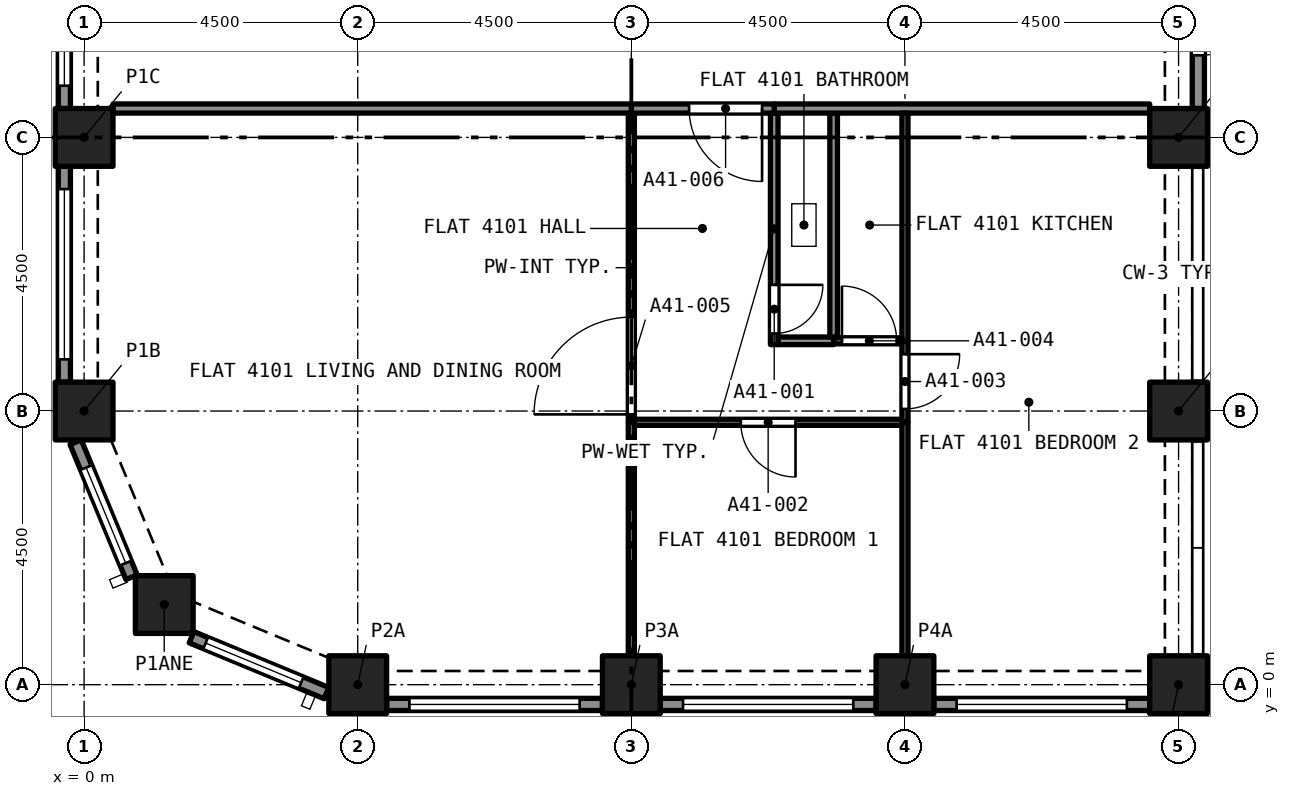
"""IFC4 building model, lengths in metres.
Left out: names, types, materials, properties, quantities, classifications, styles, units other than length and angle.
Written with IfcOpenShell. Run it as: python <this file> out.ifc"""

import sys

from ifc_helpers import new_model, si_unit, direction, frame, frame_2d, origin, origin_2d, place, context, subcontext, project, spatial, rectangle, extrude, element, fill, save


model = new_model("IFC4")
c1 = context("Model", 3, precision=1e-05, world=origin(), true_north=direction((0.0, 1.0)))
c2 = subcontext(c1, "Body", "Model", "MODEL_VIEW")
j1 = project(units=[si_unit("LENGTHUNIT", "METRE"), si_unit("PLANEANGLEUNIT", "RADIAN")], contexts=[c1])
p1 = place(None, origin())
s1 = spatial("IfcSite", under=j1, at=p1, CompositionType="ELEMENT")
p2 = place(p1, origin())
s2 = spatial("IfcBuilding", under=s1, at=p2, CompositionType="ELEMENT")
p3 = place(p2, frame((0.0, 0.0, 146.2)))
s3 = spatial("IfcBuildingStorey", under=s2, at=p3, CompositionType="ELEMENT", Elevation=146.2)
for number, where, z_axis, x_axis in (
    (1, (4.5, 0.0, 0.0), (0.0, 0.0, 1.0), (1.0, 0.0, 0.0)),
    (2, (9.0, 0.0, 0.0), (0.0, 0.0, 1.0), (1.0, 0.0, 0.0)),
    (3, (13.5, 0.0, 0.0), (0.0, 0.0, 1.0), (1.0, 0.0, 0.0)),
    (4, (18.0, 0.0, 0.0), (0.0, 0.0, 1.0), (1.0, 0.0, 0.0)),
    (5, (1.318, 1.318, 0.0), (0.0, 0.0, 1.0), (1.0, 0.0, 0.0)),
    (6, (0.0, 4.5, 0.0), (0.0, 0.0, 1.0), (1.0, 0.0, 0.0)),
    (7, (18.0, 4.5, 0.0), (0.0, 0.0, 1.0), (1.0, 0.0, 0.0)),
    (8, (0.0, 9.0, 0.0), (0.0, 0.0, 1.0), (1.0, 0.0, 0.0)),
    (9, (18.0, 9.0, 0.0), (0.0, 0.0, 1.0), (1.0, 0.0, 0.0)),
):
    element("IfcColumn", number, at=place(p3, frame(where, z_axis=z_axis, x_axis=x_axis)), inside=s3, PredefinedType="COLUMN", context=c2, shape_type="SweptSolid", body=[
        extrude(rectangle(XDim=0.95, YDim=0.95, at=origin_2d()), origin(), (0.0, 0.0, 1.0), 4.4),
    ])
p4 = place(p3, frame((-0.325, 9.475, 0.0), z_axis=(0.0, 0.0, 1.0), x_axis=(0.0, 1.0, 0.0)))
e10 = element("IfcWall", 10, at=p4, inside=s3, PredefinedType="SOLIDWALL", context=c2, shape_type="SweptSolid", body=[
    extrude(rectangle(XDim=3.55, YDim=0.2, at=frame_2d((1.775, 0.0))), origin(), (0.0, 0.0, 1.0), 4.4),
])
p5 = place(p4, frame((0.375, 0.0, 0.45)))
e11 = element("IfcOpeningElement", 11, at=p5, cuts=e10, PredefinedType="OPENING", context=c2, shape_type="SweptSolid", body=[
    extrude(rectangle(XDim=2.8, YDim=2.55, at=frame_2d((1.4, 1.275))), frame((0.0, 0.11, 0.0), z_axis=(0.0, -1.0, 0.0), x_axis=(1.0, 0.0, 0.0)), (0.0, 0.0, 1.0), 0.22),
])
p6 = place(p3, frame((-0.325, 4.975, 0.0), z_axis=(0.0, 0.0, 1.0), x_axis=(0.0, 1.0, 0.0)))
e12 = element("IfcWall", 12, at=p6, inside=s3, PredefinedType="SOLIDWALL", context=c2, shape_type="SweptSolid", body=[
    extrude(rectangle(XDim=3.55, YDim=0.2, at=frame_2d((1.775, 0.0))), origin(), (0.0, 0.0, 1.0), 4.4),
])
p7 = place(p6, frame((0.375, 0.0, 0.45)))
e13 = element("IfcOpeningElement", 13, at=p7, cuts=e12, PredefinedType="OPENING", context=c2, shape_type="SweptSolid", body=[
    extrude(rectangle(XDim=2.8, YDim=2.55, at=frame_2d((1.4, 1.275))), frame((0.0, 0.11, 0.0), z_axis=(0.0, -1.0, 0.0), x_axis=(1.0, 0.0, 0.0)), (0.0, 0.0, 1.0), 0.22),
])
p8 = place(p3, frame((0.78, 1.767, 0.0), z_axis=(0.0, 0.0, 1.0), x_axis=(-0.382680855588, 0.923880599843, 0.0)))
e14 = element("IfcWall", 14, at=p8, inside=s3, PredefinedType="SOLIDWALL", context=c2, shape_type="SweptSolid", body=[
    extrude(rectangle(XDim=2.403, YDim=0.2, at=frame_2d((1.201, 0.0))), origin(), (0.0, 0.0, 1.0), 4.4),
])
p9 = place(p8, frame((0.251, 0.0, 0.45)))
e15 = element("IfcOpeningElement", 15, at=p9, cuts=e14, PredefinedType="OPENING", context=c2, shape_type="SweptSolid", body=[
    extrude(rectangle(XDim=1.7, YDim=2.55, at=frame_2d((0.85, 1.275))), frame((0.0, 0.11, 0.0), z_axis=(0.0, -1.0, 0.0), x_axis=(1.0, 0.0, 0.0)), (0.0, 0.0, 1.0), 0.22),
])
p10 = place(p3, frame((3.987, -0.139, 0.0), z_axis=(0.0, 0.0, 1.0), x_axis=(-0.923880599843, 0.382680855588, 0.0)))
e16 = element("IfcWall", 16, at=p10, inside=s3, PredefinedType="SOLIDWALL", context=c2, shape_type="SweptSolid", body=[
    extrude(rectangle(XDim=2.403, YDim=0.2, at=frame_2d((1.201, 0.0))), origin(), (0.0, 0.0, 1.0), 4.4),
])
p11 = place(p10, frame((0.451, 0.0, 0.45)))
e17 = element("IfcOpeningElement", 17, at=p11, cuts=e16, PredefinedType="OPENING", context=c2, shape_type="SweptSolid", body=[
    extrude(rectangle(XDim=1.7, YDim=2.55, at=frame_2d((0.85, 1.275))), frame((0.0, 0.11, 0.0), z_axis=(0.0, -1.0, 0.0), x_axis=(1.0, 0.0, 0.0)), (0.0, 0.0, 1.0), 0.22),
])
p12 = place(p3, frame((8.525, -0.325, 0.0), z_axis=(0.0, 0.0, 1.0), x_axis=(-1.0, 0.0, 0.0)))
e18 = element("IfcWall", 18, at=p12, inside=s3, PredefinedType="SOLIDWALL", context=c2, shape_type="SweptSolid", body=[
    extrude(rectangle(XDim=3.55, YDim=0.2, at=frame_2d((1.775, 0.0))), origin(), (0.0, 0.0, 1.0), 4.4),
])
p13 = place(p12, frame((0.375, 0.0, 0.45)))
e19 = element("IfcOpeningElement", 19, at=p13, cuts=e18, PredefinedType="OPENING", context=c2, shape_type="SweptSolid", body=[
    extrude(rectangle(XDim=2.8, YDim=2.55, at=frame_2d((1.4, 1.275))), frame((0.0, 0.11, 0.0), z_axis=(0.0, -1.0, 0.0), x_axis=(1.0, 0.0, 0.0)), (0.0, 0.0, 1.0), 0.22),
])
p14 = place(p3, frame((13.025, -0.325, 0.0), z_axis=(0.0, 0.0, 1.0), x_axis=(-1.0, 0.0, 0.0)))
e20 = element("IfcWall", 20, at=p14, inside=s3, PredefinedType="SOLIDWALL", context=c2, shape_type="SweptSolid", body=[
    extrude(rectangle(XDim=3.55, YDim=0.2, at=frame_2d((1.775, 0.0))), origin(), (0.0, 0.0, 1.0), 4.4),
])
p15 = place(p14, frame((0.375, 0.0, 0.45)))
e21 = element("IfcOpeningElement", 21, at=p15, cuts=e20, PredefinedType="OPENING", context=c2, shape_type="SweptSolid", body=[
    extrude(rectangle(XDim=2.8, YDim=2.55, at=frame_2d((1.4, 1.275))), frame((0.0, 0.11, 0.0), z_axis=(0.0, -1.0, 0.0), x_axis=(1.0, 0.0, 0.0)), (0.0, 0.0, 1.0), 0.22),
])
p16 = place(p3, frame((17.525, -0.325, 0.0), z_axis=(0.0, 0.0, 1.0), x_axis=(-1.0, 0.0, 0.0)))
e22 = element("IfcWall", 22, at=p16, inside=s3, PredefinedType="SOLIDWALL", context=c2, shape_type="SweptSolid", body=[
    extrude(rectangle(XDim=3.55, YDim=0.2, at=frame_2d((1.775, 0.0))), origin(), (0.0, 0.0, 1.0), 4.4),
])
p17 = place(p16, frame((0.375, 0.0, 0.45)))
e23 = element("IfcOpeningElement", 23, at=p17, cuts=e22, PredefinedType="OPENING", context=c2, shape_type="SweptSolid", body=[
    extrude(rectangle(XDim=2.8, YDim=2.55, at=frame_2d((1.4, 1.275))), frame((0.0, 0.11, 0.0), z_axis=(0.0, -1.0, 0.0), x_axis=(1.0, 0.0, 0.0)), (0.0, 0.0, 1.0), 0.22),
])
p18 = place(p3, frame((18.325, 13.025, 0.0), z_axis=(0.0, 0.0, 1.0), x_axis=(0.0, -1.0, 0.0)))
e24 = element("IfcWall", 24, at=p18, inside=s3, PredefinedType="SOLIDWALL", context=c2, shape_type="SweptSolid", body=[
    extrude(rectangle(XDim=3.55, YDim=0.2, at=frame_2d((1.775, 0.0))), origin(), (0.0, 0.0, 1.0), 4.4),
])
p19 = place(p18, frame((0.875, 0.0, 0.0)))
e25 = element("IfcOpeningElement", 25, at=p19, cuts=e24, PredefinedType="OPENING", context=c2, shape_type="SweptSolid", body=[
    extrude(rectangle(XDim=1.8, YDim=2.4, at=frame_2d((0.9, 1.2))), frame((0.0, 0.11, 0.0), z_axis=(0.0, -1.0, 0.0), x_axis=(1.0, 0.0, 0.0)), (0.0, 0.0, 1.0), 0.22),
])
p20 = place(p3, frame((11.413, 5.655, 0.0), z_axis=(0.0, 0.0, 1.0), x_axis=(1.0, 0.0, 0.0)))
e26 = element("IfcWall", 26, at=p20, inside=s3, PredefinedType="PARTITIONING", context=c2, shape_type="SweptSolid", body=[
    extrude(rectangle(XDim=0.915, YDim=0.125, at=frame_2d((0.458, 0.0))), origin(), (0.0, 0.0, 1.0), 4.1),
])
p21 = place(p3, frame((11.35, 9.4, 0.0), z_axis=(0.0, 0.0, 1.0), x_axis=(0.0, -1.0, 0.0)))
e27 = element("IfcWall", 27, at=p21, inside=s3, PredefinedType="PARTITIONING", context=c2, shape_type="SweptSolid", body=[
    extrude(rectangle(XDim=3.807, YDim=0.125, at=frame_2d((1.904, 0.0))), origin(), (0.0, 0.0, 1.0), 4.1),
])
p22 = place(p21, frame((2.825, 0.0, 0.0)))
e28 = element("IfcOpeningElement", 28, at=p22, cuts=e27, PredefinedType="OPENING", context=c2, shape_type="SweptSolid", body=[
    extrude(rectangle(XDim=0.8, YDim=2.1, at=frame_2d((0.4, 1.05))), frame((0.0, 0.073, 0.0), z_axis=(0.0, -1.0, 0.0), x_axis=(1.0, 0.0, 0.0)), (0.0, 0.0, 1.0), 0.145),
])
p23 = place(p3, frame((12.327, 5.718, 0.0), z_axis=(0.0, 0.0, 1.0), x_axis=(0.0, 1.0, 0.0)))
e29 = element("IfcWall", 29, at=p23, inside=s3, PredefinedType="PARTITIONING", context=c2, shape_type="SweptSolid", body=[
    extrude(rectangle(XDim=3.682, YDim=0.125, at=frame_2d((1.841, 0.0))), origin(), (0.0, 0.0, 1.0), 4.1),
])
p24 = place(p3, frame((11.35, 9.475, 0.0), z_axis=(0.0, 0.0, 1.0), x_axis=(1.0, 0.0, 0.0)))
e30 = element("IfcWall", 30, at=p24, inside=s3, PredefinedType="PARTITIONING", context=c2, shape_type="SweptSolid", body=[
    extrude(rectangle(XDim=6.175, YDim=0.15, at=frame_2d((3.087, 0.0))), origin(), (0.0, 0.0, 1.0), 4.1),
])
p25 = place(p3, frame((13.5, 0.475, 0.0), z_axis=(0.0, 0.0, 1.0), x_axis=(0.0, 1.0, 0.0)))
e31 = element("IfcWall", 31, at=p25, inside=s3, PredefinedType="PARTITIONING", context=c2, shape_type="SweptSolid", body=[
    extrude(rectangle(XDim=3.84, YDim=0.1, at=frame_2d((1.92, 0.0))), origin(), (0.0, 0.0, 1.0), 4.1),
])
p26 = place(p3, frame((13.45, 4.315, 0.0), z_axis=(0.0, 0.0, 1.0), x_axis=(-1.0, 0.0, 0.0)))
e32 = element("IfcWall", 32, at=p26, inside=s3, PredefinedType="PARTITIONING", context=c2, shape_type="SweptSolid", body=[
    extrude(rectangle(XDim=4.4, YDim=0.1, at=frame_2d((2.2, 0.0))), origin(), (0.0, 0.0, 1.0), 4.1),
])
p27 = place(p26, frame((1.75, 0.0, 0.0)))
e33 = element("IfcOpeningElement", 33, at=p27, cuts=e32, PredefinedType="OPENING", context=c2, shape_type="SweptSolid", body=[
    extrude(rectangle(XDim=0.9, YDim=2.1, at=frame_2d((0.45, 1.05))), frame((0.0, 0.06, 0.0), z_axis=(0.0, -1.0, 0.0), x_axis=(1.0, 0.0, 0.0)), (0.0, 0.0, 1.0), 0.12),
])
p28 = place(p3, frame((9.0, 0.475, 0.0), z_axis=(0.0, 0.0, 1.0), x_axis=(0.0, 1.0, 0.0)))
e34 = element("IfcWall", 34, at=p28, inside=s3, PredefinedType="PARTITIONING", context=c2, shape_type="SweptSolid", body=[
    extrude(rectangle(XDim=3.84, YDim=0.1, at=frame_2d((1.92, 0.0))), origin(), (0.0, 0.0, 1.0), 4.1),
])
p29 = place(p3, frame((13.5, 5.655, 0.0), z_axis=(0.0, 0.0, 1.0), x_axis=(0.0, -1.0, 0.0)))
e35 = element("IfcWall", 35, at=p29, inside=s3, PredefinedType="PARTITIONING", context=c2, shape_type="SweptSolid", body=[
    extrude(rectangle(XDim=1.34, YDim=0.1, at=frame_2d((0.67, 0.0))), origin(), (0.0, 0.0, 1.0), 4.1),
])
p30 = place(p29, frame((0.22, 0.0, 0.0)))
e36 = element("IfcOpeningElement", 36, at=p30, cuts=e35, PredefinedType="OPENING", context=c2, shape_type="SweptSolid", body=[
    extrude(rectangle(XDim=0.9, YDim=2.1, at=frame_2d((0.45, 1.05))), frame((0.0, 0.06, 0.0), z_axis=(0.0, -1.0, 0.0), x_axis=(1.0, 0.0, 0.0)), (0.0, 0.0, 1.0), 0.12),
])
p31 = place(p3, frame((13.5, 5.655, 0.0), z_axis=(0.0, 0.0, 1.0), x_axis=(0.0, 1.0, 0.0)))
e37 = element("IfcWall", 37, at=p31, inside=s3, PredefinedType="PARTITIONING", context=c2, shape_type="SweptSolid", body=[
    extrude(rectangle(XDim=3.745, YDim=0.1, at=frame_2d((1.873, 0.0))), origin(), (0.0, 0.0, 1.0), 4.1),
])
p32 = place(p3, frame((12.327, 5.655, 0.0), z_axis=(0.0, 0.0, 1.0), x_axis=(1.0, 0.0, 0.0)))
e38 = element("IfcWall", 38, at=p32, inside=s3, PredefinedType="PARTITIONING", context=c2, shape_type="SweptSolid", body=[
    extrude(rectangle(XDim=1.123, YDim=0.1, at=frame_2d((0.561, 0.0))), origin(), (0.0, 0.0, 1.0), 4.1),
])
p33 = place(p32, frame((0.136, 0.0, 0.0)))
e39 = element("IfcOpeningElement", 39, at=p33, cuts=e38, PredefinedType="OPENING", context=c2, shape_type="SweptSolid", body=[
    extrude(rectangle(XDim=0.9, YDim=2.1, at=frame_2d((0.45, 1.05))), frame((0.0, 0.06, 0.0), z_axis=(0.0, -1.0, 0.0), x_axis=(1.0, 0.0, 0.0)), (0.0, 0.0, 1.0), 0.12),
])
p34 = place(p3, frame((9.0, 4.315, 0.0), z_axis=(0.0, 0.0, 1.0), x_axis=(0.0, 1.0, 0.0)))
e40 = element("IfcWall", 40, at=p34, inside=s3, PredefinedType="PARTITIONING", context=c2, shape_type="SweptSolid", body=[
    extrude(rectangle(XDim=5.085, YDim=0.1, at=frame_2d((2.542, 0.0))), origin(), (0.0, 0.0, 1.0), 4.1),
])
p35 = place(p34, frame((0.13, 0.0, 0.0)))
e41 = element("IfcOpeningElement", 41, at=p35, cuts=e40, PredefinedType="OPENING", context=c2, shape_type="SweptSolid", body=[
    extrude(rectangle(XDim=1.6, YDim=2.1, at=frame_2d((0.8, 1.05))), frame((0.0, 0.06, 0.0), z_axis=(0.0, -1.0, 0.0), x_axis=(1.0, 0.0, 0.0)), (0.0, 0.0, 1.0), 0.12),
])
p36 = place(p3, frame((11.35, 9.475, 0.0), z_axis=(0.0, 0.0, 1.0), x_axis=(-1.0, 0.0, 0.0)))
e42 = element("IfcWall", 42, at=p36, inside=s3, PredefinedType="PARTITIONING", context=c2, shape_type="SweptSolid", body=[
    extrude(rectangle(XDim=2.35, YDim=0.15, at=frame_2d((1.175, 0.0))), origin(), (0.0, 0.0, 1.0), 4.1),
])
p37 = place(p36, frame((0.2, 0.0, 0.0)))
e43 = element("IfcOpeningElement", 43, at=p37, cuts=e42, PredefinedType="OPENING", context=c2, shape_type="SweptSolid", body=[
    extrude(rectangle(XDim=1.2, YDim=2.4, at=frame_2d((0.6, 1.2))), frame((0.0, 0.085, 0.0), z_axis=(0.0, -1.0, 0.0), x_axis=(1.0, 0.0, 0.0)), (0.0, 0.0, 1.0), 0.17),
])
p38 = place(p3, frame((0.475, 9.475, 0.0), z_axis=(0.0, 0.0, 1.0), x_axis=(1.0, 0.0, 0.0)))
e44 = element("IfcWall", 44, at=p38, inside=s3, PredefinedType="PARTITIONING", context=c2, shape_type="SweptSolid", body=[
    extrude(rectangle(XDim=8.525, YDim=0.15, at=frame_2d((4.262, 0.0))), origin(), (0.0, 0.0, 1.0), 4.1),
])
p39 = place(p5, origin())
e45 = element("IfcWindow", 45, at=p39, inside=s3, PartitioningType="SINGLE_PANEL", PredefinedType="WINDOW", context=c2, shape_type="SweptSolid", body=[
    extrude(rectangle(XDim=2.8, YDim=2.55, at=frame_2d((1.4, 1.275))), frame((0.0, 0.03, 0.0), z_axis=(0.0, -1.0, 0.0), x_axis=(1.0, 0.0, 0.0)), (0.0, 0.0, 1.0), 0.06),
])
fill(e11, e45)
p40 = place(p7, origin())
e46 = element("IfcWindow", 46, at=p40, inside=s3, PartitioningType="SINGLE_PANEL", PredefinedType="WINDOW", context=c2, shape_type="SweptSolid", body=[
    extrude(rectangle(XDim=2.8, YDim=2.55, at=frame_2d((1.4, 1.275))), frame((0.0, 0.03, 0.0), z_axis=(0.0, -1.0, 0.0), x_axis=(1.0, 0.0, 0.0)), (0.0, 0.0, 1.0), 0.06),
])
fill(e13, e46)
p41 = place(p9, origin())
e47 = element("IfcWindow", 47, at=p41, inside=s3, PartitioningType="SINGLE_PANEL", PredefinedType="WINDOW", context=c2, shape_type="SweptSolid", body=[
    extrude(rectangle(XDim=1.7, YDim=2.55, at=frame_2d((0.85, 1.275))), frame((0.0, 0.03, 0.0), z_axis=(0.0, -1.0, 0.0), x_axis=(1.0, 0.0, 0.0)), (0.0, 0.0, 1.0), 0.06),
])
fill(e15, e47)
p42 = place(p11, origin())
e48 = element("IfcWindow", 48, at=p42, inside=s3, PartitioningType="SINGLE_PANEL", PredefinedType="WINDOW", context=c2, shape_type="SweptSolid", body=[
    extrude(rectangle(XDim=1.7, YDim=2.55, at=frame_2d((0.85, 1.275))), frame((0.0, 0.03, 0.0), z_axis=(0.0, -1.0, 0.0), x_axis=(1.0, 0.0, 0.0)), (0.0, 0.0, 1.0), 0.06),
])
fill(e17, e48)
p43 = place(p13, origin())
e49 = element("IfcWindow", 49, at=p43, inside=s3, PartitioningType="SINGLE_PANEL", PredefinedType="WINDOW", context=c2, shape_type="SweptSolid", body=[
    extrude(rectangle(XDim=2.8, YDim=2.55, at=frame_2d((1.4, 1.275))), frame((0.0, 0.03, 0.0), z_axis=(0.0, -1.0, 0.0), x_axis=(1.0, 0.0, 0.0)), (0.0, 0.0, 1.0), 0.06),
])
fill(e19, e49)
p44 = place(p15, origin())
e50 = element("IfcWindow", 50, at=p44, inside=s3, PartitioningType="SINGLE_PANEL", PredefinedType="WINDOW", context=c2, shape_type="SweptSolid", body=[
    extrude(rectangle(XDim=2.8, YDim=2.55, at=frame_2d((1.4, 1.275))), frame((0.0, 0.03, 0.0), z_axis=(0.0, -1.0, 0.0), x_axis=(1.0, 0.0, 0.0)), (0.0, 0.0, 1.0), 0.06),
])
fill(e21, e50)
p45 = place(p17, origin())
e51 = element("IfcWindow", 51, at=p45, inside=s3, PartitioningType="SINGLE_PANEL", PredefinedType="WINDOW", context=c2, shape_type="SweptSolid", body=[
    extrude(rectangle(XDim=2.8, YDim=2.55, at=frame_2d((1.4, 1.275))), frame((0.0, 0.03, 0.0), z_axis=(0.0, -1.0, 0.0), x_axis=(1.0, 0.0, 0.0)), (0.0, 0.0, 1.0), 0.06),
])
fill(e23, e51)
p46 = place(p19, origin())
e52 = element("IfcDoor", 52, at=p46, inside=s3, OperationType="DOUBLE_DOOR_SINGLE_SWING", PredefinedType="DOOR", context=c2, shape_type="SweptSolid", body=[
    extrude(rectangle(XDim=1.8, YDim=2.4, at=frame_2d((0.9, 1.2))), frame((0.0, 0.025, 0.0), z_axis=(0.0, -1.0, 0.0), x_axis=(1.0, 0.0, 0.0)), (0.0, 0.0, 1.0), 0.05),
])
fill(e25, e52)
p47 = place(p22, origin())
e53 = element("IfcDoor", 53, at=p47, inside=s3, OperationType="SINGLE_SWING_RIGHT", PredefinedType="DOOR", context=c2, shape_type="SweptSolid", body=[
    extrude(rectangle(XDim=0.8, YDim=2.1, at=frame_2d((0.4, 1.05))), frame((0.0, 0.025, 0.0), z_axis=(0.0, -1.0, 0.0), x_axis=(1.0, 0.0, 0.0)), (0.0, 0.0, 1.0), 0.05),
])
fill(e28, e53)
p48 = place(p27, origin())
e54 = element("IfcDoor", 54, at=p48, inside=s3, OperationType="SINGLE_SWING_RIGHT", PredefinedType="DOOR", context=c2, shape_type="SweptSolid", body=[
    extrude(rectangle(XDim=0.9, YDim=2.1, at=frame_2d((0.45, 1.05))), frame((0.0, 0.025, 0.0), z_axis=(0.0, -1.0, 0.0), x_axis=(1.0, 0.0, 0.0)), (0.0, 0.0, 1.0), 0.05),
])
fill(e33, e54)
p49 = place(p30, origin())
e55 = element("IfcDoor", 55, at=p49, inside=s3, OperationType="SINGLE_SWING_RIGHT", PredefinedType="DOOR", context=c2, shape_type="SweptSolid", body=[
    extrude(rectangle(XDim=0.9, YDim=2.1, at=frame_2d((0.45, 1.05))), frame((0.0, 0.025, 0.0), z_axis=(0.0, -1.0, 0.0), x_axis=(1.0, 0.0, 0.0)), (0.0, 0.0, 1.0), 0.05),
])
fill(e36, e55)
p50 = place(p33, origin())
e56 = element("IfcDoor", 56, at=p50, inside=s3, OperationType="SINGLE_SWING_RIGHT", PredefinedType="DOOR", context=c2, shape_type="SweptSolid", body=[
    extrude(rectangle(XDim=0.9, YDim=2.1, at=frame_2d((0.45, 1.05))), frame((0.0, 0.025, 0.0), z_axis=(0.0, -1.0, 0.0), x_axis=(1.0, 0.0, 0.0)), (0.0, 0.0, 1.0), 0.05),
])
fill(e39, e56)
p51 = place(p35, origin())
e57 = element("IfcDoor", 57, at=p51, inside=s3, OperationType="SINGLE_SWING_LEFT", PredefinedType="DOOR", context=c2, shape_type="SweptSolid", body=[
    extrude(rectangle(XDim=1.6, YDim=2.1, at=frame_2d((0.8, 1.05))), frame((0.0, 0.025, 0.0), z_axis=(0.0, -1.0, 0.0), x_axis=(1.0, 0.0, 0.0)), (0.0, 0.0, 1.0), 0.05),
])
fill(e41, e57)
p52 = place(p37, origin())
e58 = element("IfcDoor", 58, at=p52, inside=s3, OperationType="SINGLE_SWING_LEFT", PredefinedType="DOOR", context=c2, shape_type="SweptSolid", body=[
    extrude(rectangle(XDim=1.2, YDim=2.4, at=frame_2d((0.6, 1.2))), frame((0.0, 0.025, 0.0), z_axis=(0.0, -1.0, 0.0), x_axis=(1.0, 0.0, 0.0)), (0.0, 0.0, 1.0), 0.05),
])
fill(e43, e58)
save(model, sys.argv[1])
